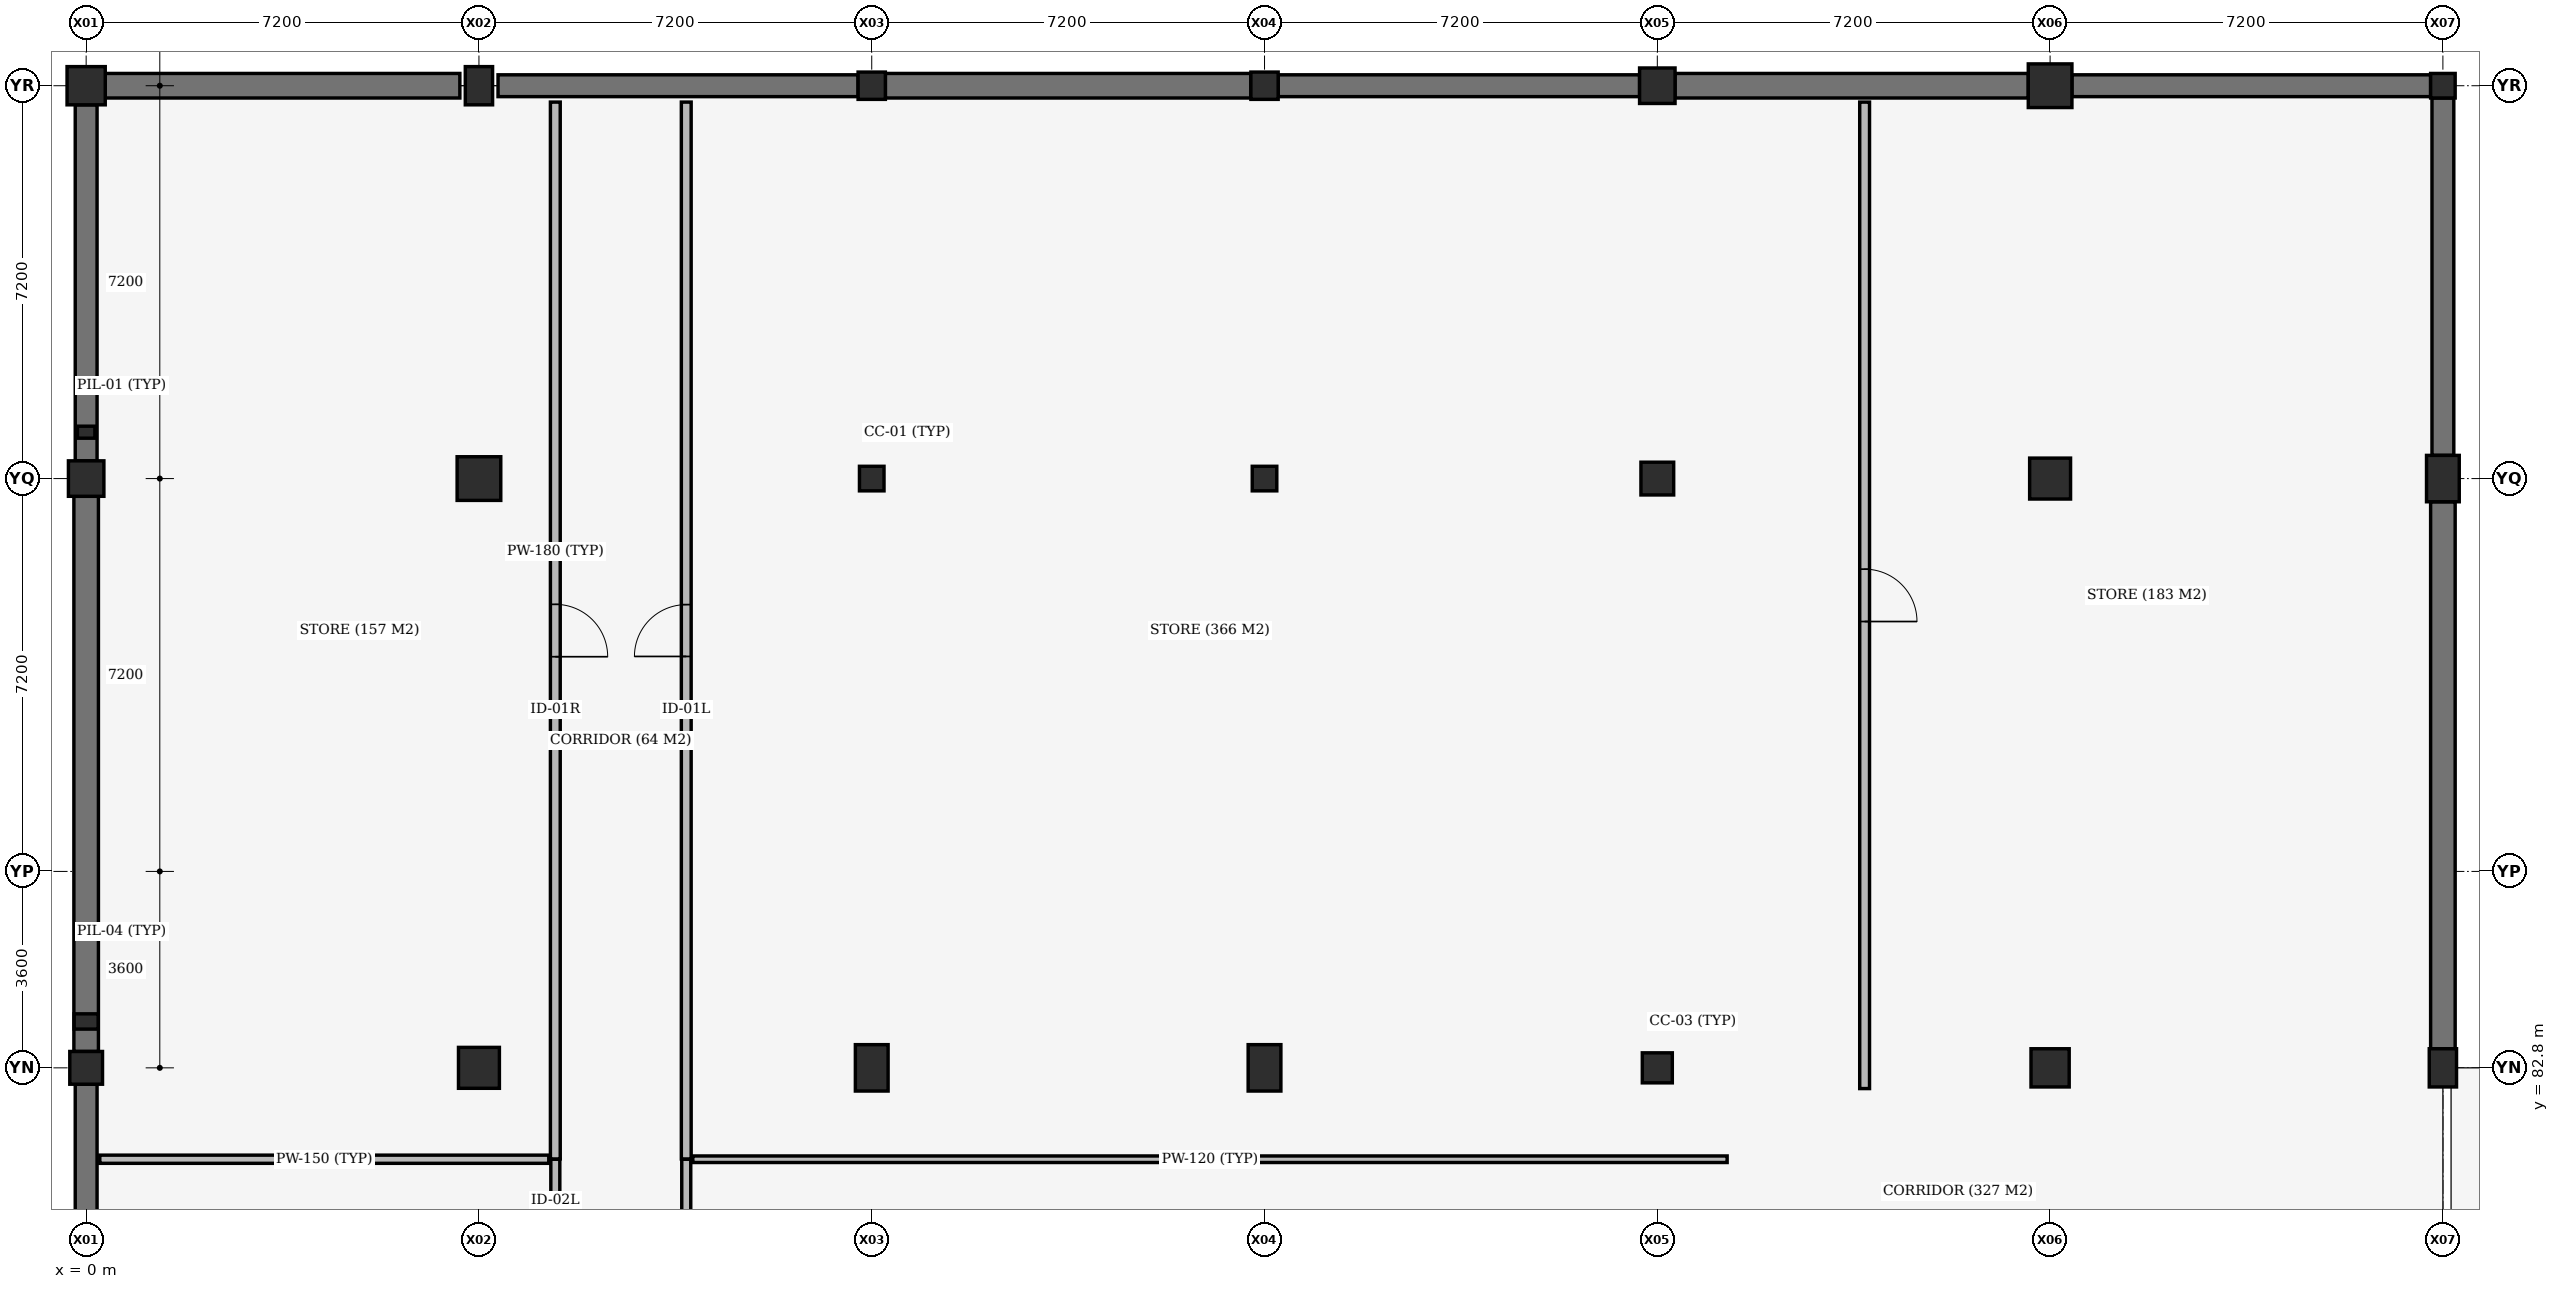
"""IFC4 building model, lengths in metres.
Left out: names, types, materials, properties, quantities, classifications, styles, units other than length and angle.
Written with IfcOpenShell. Run it as: python <this file> out.ifc"""

import sys

from ifc_helpers import new_model, si_unit, direction, frame, frame_2d, origin, origin_2d, place, context, subcontext, project, spatial, rectangle, extrude, element, fill, save


model = new_model("IFC4")
c1 = context("Model", 3, precision=1e-05, world=origin(), true_north=direction((0.0, 1.0)))
c2 = subcontext(c1, "Body", "Model", "MODEL_VIEW")
j1 = project(units=[si_unit("LENGTHUNIT", "METRE"), si_unit("PLANEANGLEUNIT", "RADIAN")], contexts=[c1])
p1 = place(None, origin())
s1 = spatial("IfcSite", under=j1, at=p1, CompositionType="ELEMENT")
p2 = place(p1, origin())
s2 = spatial("IfcBuilding", under=s1, at=p2, CompositionType="ELEMENT")
p3 = place(p2, frame((0.0, 0.0, -4.5)))
s3 = spatial("IfcBuildingStorey", under=s2, at=p3, CompositionType="ELEMENT", Elevation=-4.5)
p4 = place(p3, frame((0.0, 82.8, -0.42), z_axis=(0.0, 0.0, 1.0), x_axis=(1.0, 0.0, 0.0)))
e1 = element("IfcColumn", 1, at=p4, inside=s3, PredefinedType="COLUMN", context=c2, shape_type="SweptSolid", body=[
    extrude(rectangle(XDim=0.6, YDim=0.6, at=origin_2d()), origin(), (0.0, 0.0, 1.0), 4.6),
])
p5 = place(p3, frame((0.0, 93.6, -0.42), z_axis=(0.0, 0.0, 1.0), x_axis=(1.0, 0.0, 0.0)))
e2 = element("IfcColumn", 2, at=p5, inside=s3, PredefinedType="COLUMN", context=c2, shape_type="SweptSolid", body=[
    extrude(rectangle(XDim=0.65, YDim=0.65, at=origin_2d()), origin(), (0.0, 0.0, 1.0), 4.6),
])
p6 = place(p3, frame((0.0, 100.8, -0.42), z_axis=(0.0, 0.0, 1.0), x_axis=(1.0, 0.0, 0.0)))
e3 = element("IfcColumn", 3, at=p6, inside=s3, PredefinedType="COLUMN", context=c2, shape_type="SweptSolid", body=[
    extrude(rectangle(XDim=0.7, YDim=0.7, at=origin_2d()), origin(), (0.0, 0.0, 1.0), 4.6),
])
p7 = place(p3, frame((7.2, 82.8, -0.42), z_axis=(0.0, 0.0, 1.0), x_axis=(1.0, 0.0, 0.0)))
e4 = element("IfcColumn", 4, at=p7, inside=s3, PredefinedType="COLUMN", context=c2, shape_type="SweptSolid", body=[
    extrude(rectangle(XDim=0.75, YDim=0.75, at=origin_2d()), origin(), (0.0, 0.0, 1.0), 4.6),
])
p8 = place(p3, frame((7.2, 93.6, -0.42), z_axis=(0.0, 0.0, 1.0), x_axis=(1.0, 0.0, 0.0)))
e5 = element("IfcColumn", 5, at=p8, inside=s3, PredefinedType="COLUMN", context=c2, shape_type="SweptSolid", body=[
    extrude(rectangle(XDim=0.8, YDim=0.8, at=origin_2d()), origin(), (0.0, 0.0, 1.0), 4.6),
])
p9 = place(p3, frame((7.2, 100.8, -0.42), z_axis=(0.0, 0.0, 1.0), x_axis=(1.0, 0.0, 0.0)))
e6 = element("IfcColumn", 6, at=p9, inside=s3, PredefinedType="COLUMN", context=c2, shape_type="SweptSolid", body=[
    extrude(rectangle(XDim=0.5, YDim=0.7, at=origin_2d()), origin(), (0.0, 0.0, 1.0), 4.6),
])
p10 = place(p3, frame((14.4, 82.8, -0.42), z_axis=(0.0, 0.0, 1.0), x_axis=(1.0, 0.0, 0.0)))
e7 = element("IfcColumn", 7, at=p10, inside=s3, PredefinedType="COLUMN", context=c2, shape_type="SweptSolid", body=[
    extrude(rectangle(XDim=0.6, YDim=0.85, at=origin_2d()), origin(), (0.0, 0.0, 1.0), 4.6),
])
p11 = place(p3, frame((14.4, 93.6, -0.42), z_axis=(0.0, 0.0, 1.0), x_axis=(1.0, 0.0, 0.0)))
e8 = element("IfcColumn", 8, at=p11, inside=s3, PredefinedType="COLUMN", context=c2, shape_type="SweptSolid", body=[
    extrude(rectangle(XDim=0.45, YDim=0.45, at=origin_2d()), origin(), (0.0, 0.0, 1.0), 4.6),
])
p12 = place(p3, frame((14.4, 100.8, -0.42), z_axis=(0.0, 0.0, 1.0), x_axis=(1.0, 0.0, 0.0)))
e9 = element("IfcColumn", 9, at=p12, inside=s3, PredefinedType="COLUMN", context=c2, shape_type="SweptSolid", body=[
    extrude(rectangle(XDim=0.5, YDim=0.5, at=origin_2d()), origin(), (0.0, 0.0, 1.0), 4.6),
])
p13 = place(p3, frame((21.6, 82.8, -0.42), z_axis=(0.0, 0.0, 1.0), x_axis=(1.0, 0.0, 0.0)))
e10 = element("IfcColumn", 10, at=p13, inside=s3, PredefinedType="COLUMN", context=c2, shape_type="SweptSolid", body=[
    extrude(rectangle(XDim=0.6, YDim=0.85, at=origin_2d()), origin(), (0.0, 0.0, 1.0), 4.6),
])
p14 = place(p3, frame((21.6, 93.6, -0.42), z_axis=(0.0, 0.0, 1.0), x_axis=(1.0, 0.0, 0.0)))
e11 = element("IfcColumn", 11, at=p14, inside=s3, PredefinedType="COLUMN", context=c2, shape_type="SweptSolid", body=[
    extrude(rectangle(XDim=0.45, YDim=0.45, at=origin_2d()), origin(), (0.0, 0.0, 1.0), 4.6),
])
p15 = place(p3, frame((21.6, 100.8, -0.42), z_axis=(0.0, 0.0, 1.0), x_axis=(1.0, 0.0, 0.0)))
e12 = element("IfcColumn", 12, at=p15, inside=s3, PredefinedType="COLUMN", context=c2, shape_type="SweptSolid", body=[
    extrude(rectangle(XDim=0.5, YDim=0.5, at=origin_2d()), origin(), (0.0, 0.0, 1.0), 4.6),
])
p16 = place(p3, frame((28.8, 82.8, -0.42), z_axis=(0.0, 0.0, 1.0), x_axis=(1.0, 0.0, 0.0)))
e13 = element("IfcColumn", 13, at=p16, inside=s3, PredefinedType="COLUMN", context=c2, shape_type="SweptSolid", body=[
    extrude(rectangle(XDim=0.55, YDim=0.55, at=origin_2d()), origin(), (0.0, 0.0, 1.0), 4.6),
])
p17 = place(p3, frame((28.8, 93.6, -0.42), z_axis=(0.0, 0.0, 1.0), x_axis=(1.0, 0.0, 0.0)))
e14 = element("IfcColumn", 14, at=p17, inside=s3, PredefinedType="COLUMN", context=c2, shape_type="SweptSolid", body=[
    extrude(rectangle(XDim=0.6, YDim=0.6, at=origin_2d()), origin(), (0.0, 0.0, 1.0), 4.6),
])
p18 = place(p3, frame((28.8, 100.8, -0.42), z_axis=(0.0, 0.0, 1.0), x_axis=(1.0, 0.0, 0.0)))
e15 = element("IfcColumn", 15, at=p18, inside=s3, PredefinedType="COLUMN", context=c2, shape_type="SweptSolid", body=[
    extrude(rectangle(XDim=0.65, YDim=0.65, at=origin_2d()), origin(), (0.0, 0.0, 1.0), 4.6),
])
p19 = place(p3, frame((36.0, 82.8, -0.42), z_axis=(0.0, 0.0, 1.0), x_axis=(1.0, 0.0, 0.0)))
e16 = element("IfcColumn", 16, at=p19, inside=s3, PredefinedType="COLUMN", context=c2, shape_type="SweptSolid", body=[
    extrude(rectangle(XDim=0.7, YDim=0.7, at=origin_2d()), origin(), (0.0, 0.0, 1.0), 4.6),
])
p20 = place(p3, frame((36.0, 93.6, -0.42), z_axis=(0.0, 0.0, 1.0), x_axis=(1.0, 0.0, 0.0)))
e17 = element("IfcColumn", 17, at=p20, inside=s3, PredefinedType="COLUMN", context=c2, shape_type="SweptSolid", body=[
    extrude(rectangle(XDim=0.75, YDim=0.75, at=origin_2d()), origin(), (0.0, 0.0, 1.0), 4.6),
])
p21 = place(p3, frame((36.0, 100.8, -0.42), z_axis=(0.0, 0.0, 1.0), x_axis=(1.0, 0.0, 0.0)))
e18 = element("IfcColumn", 18, at=p21, inside=s3, PredefinedType="COLUMN", context=c2, shape_type="SweptSolid", body=[
    extrude(rectangle(XDim=0.8, YDim=0.8, at=origin_2d()), origin(), (0.0, 0.0, 1.0), 4.6),
])
p22 = place(p3, frame((43.2, 82.8, -0.42), z_axis=(0.0, 0.0, 1.0), x_axis=(1.0, 0.0, 0.0)))
e19 = element("IfcColumn", 19, at=p22, inside=s3, PredefinedType="COLUMN", context=c2, shape_type="SweptSolid", body=[
    extrude(rectangle(XDim=0.5, YDim=0.7, at=origin_2d()), origin(), (0.0, 0.0, 1.0), 4.6),
])
p23 = place(p3, frame((43.2, 93.6, -0.42), z_axis=(0.0, 0.0, 1.0), x_axis=(1.0, 0.0, 0.0)))
e20 = element("IfcColumn", 20, at=p23, inside=s3, PredefinedType="COLUMN", context=c2, shape_type="SweptSolid", body=[
    extrude(rectangle(XDim=0.6, YDim=0.85, at=origin_2d()), origin(), (0.0, 0.0, 1.0), 4.6),
])
p24 = place(p3, frame((43.2, 100.8, -0.42), z_axis=(0.0, 0.0, 1.0), x_axis=(1.0, 0.0, 0.0)))
e21 = element("IfcColumn", 21, at=p24, inside=s3, PredefinedType="COLUMN", context=c2, shape_type="SweptSolid", body=[
    extrude(rectangle(XDim=0.45, YDim=0.45, at=origin_2d()), origin(), (0.0, 0.0, 1.0), 4.6),
])
p25 = place(p3, frame((0.0, 83.65, -0.42), z_axis=(0.0, 0.0, 1.0), x_axis=(1.0, 0.0, 0.0)))
e22 = element("IfcColumn", 22, at=p25, inside=s3, PredefinedType="PILASTER", context=c2, shape_type="SweptSolid", body=[
    extrude(rectangle(XDim=0.44, YDim=0.28, at=origin_2d()), origin(), (0.0, 0.0, 1.0), 4.6),
])
p26 = place(p3, frame((0.0, 94.45, -0.42), z_axis=(0.0, 0.0, 1.0), x_axis=(1.0, 0.0, 0.0)))
e23 = element("IfcColumn", 23, at=p26, inside=s3, PredefinedType="PILASTER", context=c2, shape_type="SweptSolid", body=[
    extrude(rectangle(XDim=0.32, YDim=0.22, at=origin_2d()), origin(), (0.0, 0.0, 1.0), 4.6),
])
p27 = place(p3, frame((0.35, 100.8, 0.0), z_axis=(0.0, 0.0, 1.0), x_axis=(1.0, 0.0, 0.0)))
e24 = element("IfcWall", 24, at=p27, inside=s3, PredefinedType="USERDEFINED", context=c2, shape_type="SweptSolid", body=[
    extrude(rectangle(XDim=6.5, YDim=0.45, at=frame_2d((3.25, 0.0))), origin(), (0.0, 0.0, 1.0), 4.18),
])
p28 = place(p3, frame((7.55, 100.8, 0.0), z_axis=(0.0, 0.0, 1.0), x_axis=(1.0, 0.0, 0.0)))
e25 = element("IfcWall", 25, at=p28, inside=s3, PredefinedType="USERDEFINED", context=c2, shape_type="SweptSolid", body=[
    extrude(rectangle(XDim=6.6, YDim=0.4, at=frame_2d((3.3, 0.0))), origin(), (0.0, 0.0, 1.0), 4.18),
])
p29 = place(p3, frame((14.65, 100.8, 0.0), z_axis=(0.0, 0.0, 1.0), x_axis=(1.0, 0.0, 0.0)))
e26 = element("IfcWall", 26, at=p29, inside=s3, PredefinedType="USERDEFINED", context=c2, shape_type="SweptSolid", body=[
    extrude(rectangle(XDim=6.7, YDim=0.45, at=frame_2d((3.35, 0.0))), origin(), (0.0, 0.0, 1.0), 4.18),
])
p30 = place(p3, frame((21.85, 100.8, 0.0), z_axis=(0.0, 0.0, 1.0), x_axis=(1.0, 0.0, 0.0)))
e27 = element("IfcWall", 27, at=p30, inside=s3, PredefinedType="USERDEFINED", context=c2, shape_type="SweptSolid", body=[
    extrude(rectangle(XDim=6.625, YDim=0.4, at=frame_2d((3.312, 0.0))), origin(), (0.0, 0.0, 1.0), 4.18),
])
p31 = place(p3, frame((29.125, 100.8, 0.0), z_axis=(0.0, 0.0, 1.0), x_axis=(1.0, 0.0, 0.0)))
e28 = element("IfcWall", 28, at=p31, inside=s3, PredefinedType="USERDEFINED", context=c2, shape_type="SweptSolid", body=[
    extrude(rectangle(XDim=6.475, YDim=0.45, at=frame_2d((3.238, 0.0))), origin(), (0.0, 0.0, 1.0), 4.18),
])
p32 = place(p3, frame((36.4, 100.8, 0.0), z_axis=(0.0, 0.0, 1.0), x_axis=(1.0, 0.0, 0.0)))
e29 = element("IfcWall", 29, at=p32, inside=s3, PredefinedType="USERDEFINED", context=c2, shape_type="SweptSolid", body=[
    extrude(rectangle(XDim=6.575, YDim=0.4, at=frame_2d((3.288, 0.0))), origin(), (0.0, 0.0, 1.0), 4.18),
])
p33 = place(p3, frame((0.0, 75.875, 0.0), z_axis=(0.0, 0.0, 1.0), x_axis=(0.0, 1.0, 0.0)))
e30 = element("IfcWall", 30, at=p33, inside=s3, PredefinedType="USERDEFINED", context=c2, shape_type="SweptSolid", body=[
    extrude(rectangle(XDim=6.625, YDim=0.4, at=frame_2d((3.312, 0.0))), origin(), (0.0, 0.0, 1.0), 4.18),
])
p34 = place(p3, frame((0.0, 83.1, 0.0), z_axis=(0.0, 0.0, 1.0), x_axis=(0.0, 1.0, 0.0)))
e31 = element("IfcWall", 31, at=p34, inside=s3, PredefinedType="USERDEFINED", context=c2, shape_type="SweptSolid", body=[
    extrude(rectangle(XDim=10.175, YDim=0.45, at=frame_2d((5.087, 0.0))), origin(), (0.0, 0.0, 1.0), 4.18),
])
p35 = place(p3, frame((0.0, 93.925, 0.0), z_axis=(0.0, 0.0, 1.0), x_axis=(0.0, 1.0, 0.0)))
e32 = element("IfcWall", 32, at=p35, inside=s3, PredefinedType="USERDEFINED", context=c2, shape_type="SweptSolid", body=[
    extrude(rectangle(XDim=6.525, YDim=0.4, at=frame_2d((3.262, 0.0))), origin(), (0.0, 0.0, 1.0), 4.18),
])
p36 = place(p3, frame((43.2, 83.15, 0.0), z_axis=(0.0, 0.0, 1.0), x_axis=(0.0, 1.0, 0.0)))
e33 = element("IfcWall", 33, at=p36, inside=s3, PredefinedType="USERDEFINED", context=c2, shape_type="SweptSolid", body=[
    extrude(rectangle(XDim=10.025, YDim=0.45, at=frame_2d((5.013, 0.0))), origin(), (0.0, 0.0, 1.0), 4.18),
])
p37 = place(p3, frame((43.2, 94.025, 0.0), z_axis=(0.0, 0.0, 1.0), x_axis=(0.0, 1.0, 0.0)))
e34 = element("IfcWall", 34, at=p37, inside=s3, PredefinedType="USERDEFINED", context=c2, shape_type="SweptSolid", body=[
    extrude(rectangle(XDim=6.55, YDim=0.4, at=frame_2d((3.275, 0.0))), origin(), (0.0, 0.0, 1.0), 4.18),
])
p38 = place(p3, frame((8.6, 75.605, 0.0), z_axis=(0.0, 0.0, 1.0), x_axis=(0.0, 1.0, 0.0)))
e35 = element("IfcWall", 35, at=p38, inside=s3, PredefinedType="PARTITIONING", context=c2, shape_type="SweptSolid", body=[
    extrude(rectangle(XDim=5.52, YDim=0.165, at=frame_2d((2.76, 0.0))), origin(), (0.0, 0.0, 1.0), 3.53),
])
p39 = place(p38, frame((2.235, 0.0, 0.0)))
e36 = element("IfcOpeningElement", 36, at=p39, cuts=e35, PredefinedType="OPENING", context=c2, shape_type="SweptSolid", body=[
    extrude(rectangle(XDim=1.05, YDim=2.2, at=frame_2d((0.525, 1.1))), frame((0.0, 0.093, 0.0), z_axis=(0.0, -1.0, 0.0), x_axis=(1.0, 0.0, 0.0)), (0.0, 0.0, 1.0), 0.185),
])
p40 = place(p3, frame((0.25, 81.125, 0.0), z_axis=(0.0, 0.0, 1.0), x_axis=(1.0, 0.0, 0.0)))
e37 = element("IfcWall", 37, at=p40, inside=s3, PredefinedType="PARTITIONING", context=c2, shape_type="SweptSolid", body=[
    extrude(rectangle(XDim=8.23, YDim=0.15, at=frame_2d((4.115, 0.0))), origin(), (0.0, 0.0, 1.0), 3.38),
])
p41 = place(p3, frame((8.6, 81.13, 0.0), z_axis=(0.0, 0.0, 1.0), x_axis=(0.0, 1.0, 0.0)))
e38 = element("IfcWall", 38, at=p41, inside=s3, PredefinedType="PARTITIONING", context=c2, shape_type="SweptSolid", body=[
    extrude(rectangle(XDim=19.37, YDim=0.18, at=frame_2d((9.685, 0.0))), origin(), (0.0, 0.0, 1.0), 3.43),
])
p42 = place(p41, frame((9.205, 0.0, 0.0)))
e39 = element("IfcOpeningElement", 39, at=p42, cuts=e38, PredefinedType="OPENING", context=c2, shape_type="SweptSolid", body=[
    extrude(rectangle(XDim=0.96, YDim=2.15, at=frame_2d((0.48, 1.075))), frame((0.0, 0.1, 0.0), z_axis=(0.0, -1.0, 0.0), x_axis=(1.0, 0.0, 0.0)), (0.0, 0.0, 1.0), 0.2),
])
p43 = place(p3, frame((11.0, 75.605, 0.0), z_axis=(0.0, 0.0, 1.0), x_axis=(0.0, 1.0, 0.0)))
e40 = element("IfcWall", 40, at=p43, inside=s3, PredefinedType="PARTITIONING", context=c2, shape_type="SweptSolid", body=[
    extrude(rectangle(XDim=5.52, YDim=0.165, at=frame_2d((2.76, 0.0))), origin(), (0.0, 0.0, 1.0), 3.53),
])
p44 = place(p43, frame((2.23, 0.0, 0.0)))
e41 = element("IfcOpeningElement", 41, at=p44, cuts=e40, PredefinedType="OPENING", context=c2, shape_type="SweptSolid", body=[
    extrude(rectangle(XDim=1.06, YDim=2.2, at=frame_2d((0.53, 1.1))), frame((0.0, 0.093, 0.0), z_axis=(0.0, -1.0, 0.0), x_axis=(1.0, 0.0, 0.0)), (0.0, 0.0, 1.0), 0.185),
])
p45 = place(p3, frame((11.12, 81.125, 0.0), z_axis=(0.0, 0.0, 1.0), x_axis=(1.0, 0.0, 0.0)))
e42 = element("IfcWall", 42, at=p45, inside=s3, PredefinedType="PARTITIONING", context=c2, shape_type="SweptSolid", body=[
    extrude(rectangle(XDim=18.96, YDim=0.12, at=frame_2d((9.48, 0.0))), origin(), (0.0, 0.0, 1.0), 3.38),
])
p46 = place(p3, frame((11.0, 81.13, 0.0), z_axis=(0.0, 0.0, 1.0), x_axis=(0.0, 1.0, 0.0)))
e43 = element("IfcWall", 43, at=p46, inside=s3, PredefinedType="PARTITIONING", context=c2, shape_type="SweptSolid", body=[
    extrude(rectangle(XDim=19.37, YDim=0.18, at=frame_2d((9.685, 0.0))), origin(), (0.0, 0.0, 1.0), 3.43),
])
p47 = place(p46, frame((9.21, 0.0, 0.0)))
e44 = element("IfcOpeningElement", 44, at=p47, cuts=e43, PredefinedType="OPENING", context=c2, shape_type="SweptSolid", body=[
    extrude(rectangle(XDim=0.95, YDim=2.15, at=frame_2d((0.475, 1.075))), frame((0.0, 0.1, 0.0), z_axis=(0.0, -1.0, 0.0), x_axis=(1.0, 0.0, 0.0)), (0.0, 0.0, 1.0), 0.2),
])
p48 = place(p3, frame((32.6, 82.42, 0.0), z_axis=(0.0, 0.0, 1.0), x_axis=(0.0, 1.0, 0.0)))
e45 = element("IfcWall", 45, at=p48, inside=s3, PredefinedType="PARTITIONING", context=c2, shape_type="SweptSolid", body=[
    extrude(rectangle(XDim=18.08, YDim=0.18, at=frame_2d((9.04, 0.0))), origin(), (0.0, 0.0, 1.0), 3.53),
])
p49 = place(p48, frame((8.56, 0.0, 0.0)))
e46 = element("IfcOpeningElement", 46, at=p49, cuts=e45, PredefinedType="OPENING", context=c2, shape_type="SweptSolid", body=[
    extrude(rectangle(XDim=0.96, YDim=2.15, at=frame_2d((0.48, 1.075))), frame((0.0, 0.1, 0.0), z_axis=(0.0, -1.0, 0.0), x_axis=(1.0, 0.0, 0.0)), (0.0, 0.0, 1.0), 0.2),
])
p50 = place(p42, origin())
e47 = element("IfcDoor", 47, at=p50, inside=s3, OperationType="SINGLE_SWING_RIGHT", PredefinedType="DOOR", context=c2, shape_type="SweptSolid", body=[
    extrude(rectangle(XDim=0.96, YDim=2.15, at=frame_2d((0.48, 1.075))), frame((0.0, 0.025, 0.0), z_axis=(0.0, -1.0, 0.0), x_axis=(1.0, 0.0, 0.0)), (0.0, 0.0, 1.0), 0.05),
])
fill(e39, e47)
p51 = place(p47, origin())
e48 = element("IfcDoor", 48, at=p51, inside=s3, OperationType="SINGLE_SWING_LEFT", PredefinedType="DOOR", context=c2, shape_type="SweptSolid", body=[
    extrude(rectangle(XDim=0.95, YDim=2.15, at=frame_2d((0.475, 1.075))), frame((0.0, 0.025, 0.0), z_axis=(0.0, -1.0, 0.0), x_axis=(1.0, 0.0, 0.0)), (0.0, 0.0, 1.0), 0.05),
])
fill(e44, e48)
p52 = place(p49, origin())
e49 = element("IfcDoor", 49, at=p52, inside=s3, OperationType="SINGLE_SWING_RIGHT", PredefinedType="DOOR", context=c2, shape_type="SweptSolid", body=[
    extrude(rectangle(XDim=0.96, YDim=2.15, at=frame_2d((0.48, 1.075))), frame((0.0, 0.025, 0.0), z_axis=(0.0, -1.0, 0.0), x_axis=(1.0, 0.0, 0.0)), (0.0, 0.0, 1.0), 0.05),
])
fill(e46, e49)
save(model, sys.argv[1])
